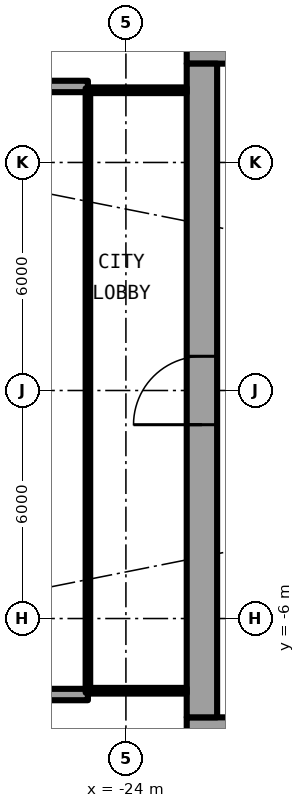
"""IFC4 building model, lengths in metres.
Left out: names, types, materials, properties, quantities, classifications, styles, units other than length and angle.
Written with IfcOpenShell. Run it as: python <this file> out.ifc"""

import sys

from ifc_helpers import new_model, si_unit, direction, frame, frame_2d, origin, place, context, subcontext, project, spatial, rectangle, extrude, element, fill, save


model = new_model("IFC4")
c1 = context("Model", 3, precision=1e-05, world=origin(), true_north=direction((0.0, 1.0)))
c2 = subcontext(c1, "Body", "Model", "MODEL_VIEW")
j1 = project(units=[si_unit("LENGTHUNIT", "METRE"), si_unit("PLANEANGLEUNIT", "RADIAN")], contexts=[c1])
p1 = place(None, origin())
s1 = spatial("IfcSite", under=j1, at=p1, CompositionType="ELEMENT")
p2 = place(p1, origin())
s2 = spatial("IfcBuilding", under=s1, at=p2, CompositionType="ELEMENT")
p3 = place(p2, frame((0.0, 0.0, 50.25)))
s3 = spatial("IfcBuildingStorey", under=s2, at=p3, CompositionType="ELEMENT", Elevation=50.25)
for number, where, z_axis, x_axis in (
    (1, (-25.0, 8.0, 0.0), (0.0, 0.0, 1.0), (-1.0, 0.0, 0.0)),
    (2, (-25.0, -8.0, 0.0), (0.0, 0.0, 1.0), (-1.0, 0.0, 0.0)),
):
    element("IfcWall", number, at=place(p3, frame(where, z_axis=z_axis, x_axis=x_axis)), inside=s3, PredefinedType="SOLIDWALL", context=c2, shape_type="SweptSolid", body=[
        extrude(rectangle(XDim=2.667, YDim=0.3, at=frame_2d((1.333, 0.0))), origin(), (0.0, 0.0, 1.0), 2.7),
    ])
p4 = place(p3, frame((-22.4, -9.0, 0.0), z_axis=(0.0, 0.0, 1.0), x_axis=(1.0, 0.0, 0.0)))
e3 = element("IfcWall", 3, at=p4, inside=s3, PredefinedType="SHEAR", context=c2, shape_type="SweptSolid", body=[
    extrude(rectangle(XDim=14.2, YDim=0.8, at=frame_2d((7.1, 0.0))), origin(), (0.0, 0.0, 1.0), 3.05),
])
p5 = place(p4, frame((1.325, 0.0, 0.0)))
e4 = element("IfcOpeningElement", 4, at=p5, cuts=e3, PredefinedType="OPENING", context=c2, shape_type="SweptSolid", body=[
    extrude(rectangle(XDim=1.2, YDim=2.3, at=frame_2d((0.6, 1.15))), frame((0.0, 0.41, 0.0), z_axis=(0.0, -1.0, 0.0), x_axis=(1.0, 0.0, 0.0)), (0.0, 0.0, 1.0), 0.82),
])
p6 = place(p3, frame((-8.2, 9.0, 0.0), z_axis=(0.0, 0.0, 1.0), x_axis=(-1.0, 0.0, 0.0)))
e5 = element("IfcWall", 5, at=p6, inside=s3, PredefinedType="SHEAR", context=c2, shape_type="SweptSolid", body=[
    extrude(rectangle(XDim=14.2, YDim=0.8, at=frame_2d((7.1, 0.0))), origin(), (0.0, 0.0, 1.0), 3.05),
])
p7 = place(p6, frame((11.675, 0.0, 0.0)))
e6 = element("IfcOpeningElement", 6, at=p7, cuts=e5, PredefinedType="OPENING", context=c2, shape_type="SweptSolid", body=[
    extrude(rectangle(XDim=1.2, YDim=2.3, at=frame_2d((0.6, 1.15))), frame((0.0, 0.41, 0.0), z_axis=(0.0, -1.0, 0.0), x_axis=(1.0, 0.0, 0.0)), (0.0, 0.0, 1.0), 0.82),
])
p8 = place(p3, frame((-22.0, -8.6, 0.0), z_axis=(0.0, 0.0, 1.0), x_axis=(0.0, 1.0, 0.0)))
e7 = element("IfcWall", 7, at=p8, inside=s3, PredefinedType="SHEAR", context=c2, shape_type="SweptSolid", body=[
    extrude(rectangle(XDim=17.2, YDim=0.8, at=frame_2d((8.6, 0.0))), origin(), (0.0, 0.0, 1.0), 3.05),
])
p9 = place(p8, frame((7.7, 0.0, 0.0)))
e8 = element("IfcOpeningElement", 8, at=p9, cuts=e7, PredefinedType="OPENING", context=c2, shape_type="SweptSolid", body=[
    extrude(rectangle(XDim=1.8, YDim=2.3, at=frame_2d((0.9, 1.15))), frame((0.0, 0.41, 0.0), z_axis=(0.0, -1.0, 0.0), x_axis=(1.0, 0.0, 0.0)), (0.0, 0.0, 1.0), 0.82),
])
for number, where, z_axis, x_axis in (
    (9, (-22.4, 7.9, 0.0), (0.0, 0.0, 1.0), (-1.0, 0.0, 0.0)),
    (10, (-22.4, -7.9, 0.0), (0.0, 0.0, 1.0), (-1.0, 0.0, 0.0)),
):
    element("IfcWall", number, at=place(p3, frame(where, z_axis=z_axis, x_axis=x_axis)), inside=s3, PredefinedType="PARTITIONING", context=c2, shape_type="SweptSolid", body=[
        extrude(rectangle(XDim=2.54, YDim=0.15, at=frame_2d((1.27, 0.0))), origin(), (0.0, 0.0, 1.0), 2.7),
    ])
p10 = place(p3, frame((-25.0, 7.95, 0.0), z_axis=(0.0, 0.0, 1.0), x_axis=(0.0, -1.0, 0.0)))
e11 = element("IfcWall", 11, at=p10, inside=s3, PredefinedType="PARTITIONING", context=c2, shape_type="SweptSolid", body=[
    extrude(rectangle(XDim=15.9, YDim=0.12, at=frame_2d((7.95, 0.0))), origin(), (0.0, 0.0, 1.0), 2.7),
])
p11 = place(p10, frame((0.95, 0.0, 0.1)))
e12 = element("IfcOpeningElement", 12, at=p11, cuts=e11, PredefinedType="OPENING", context=c2, shape_type="SweptSolid", body=[
    extrude(rectangle(XDim=14.0, YDim=2.35, at=frame_2d((7.0, 1.175))), frame((0.0, 0.07, 0.0), z_axis=(0.0, -1.0, 0.0), x_axis=(1.0, 0.0, 0.0)), (0.0, 0.0, 1.0), 0.14),
])
p12 = place(p9, origin())
e13 = element("IfcDoor", 13, at=p12, inside=s3, OperationType="SINGLE_SWING_LEFT", PredefinedType="DOOR", context=c2, shape_type="SweptSolid", body=[
    extrude(rectangle(XDim=1.8, YDim=2.3, at=frame_2d((0.9, 1.15))), frame((0.0, 0.025, 0.0), z_axis=(0.0, -1.0, 0.0), x_axis=(1.0, 0.0, 0.0)), (0.0, 0.0, 1.0), 0.05),
])
fill(e8, e13)
p13 = place(p11, origin())
e14 = element("IfcWindow", 14, at=p13, inside=s3, PartitioningType="SINGLE_PANEL", PredefinedType="WINDOW", context=c2, shape_type="SweptSolid", body=[
    extrude(rectangle(XDim=14.0, YDim=2.35, at=frame_2d((7.0, 1.175))), frame((0.0, 0.03, 0.0), z_axis=(0.0, -1.0, 0.0), x_axis=(1.0, 0.0, 0.0)), (0.0, 0.0, 1.0), 0.06),
])
fill(e12, e14)
save(model, sys.argv[1])
